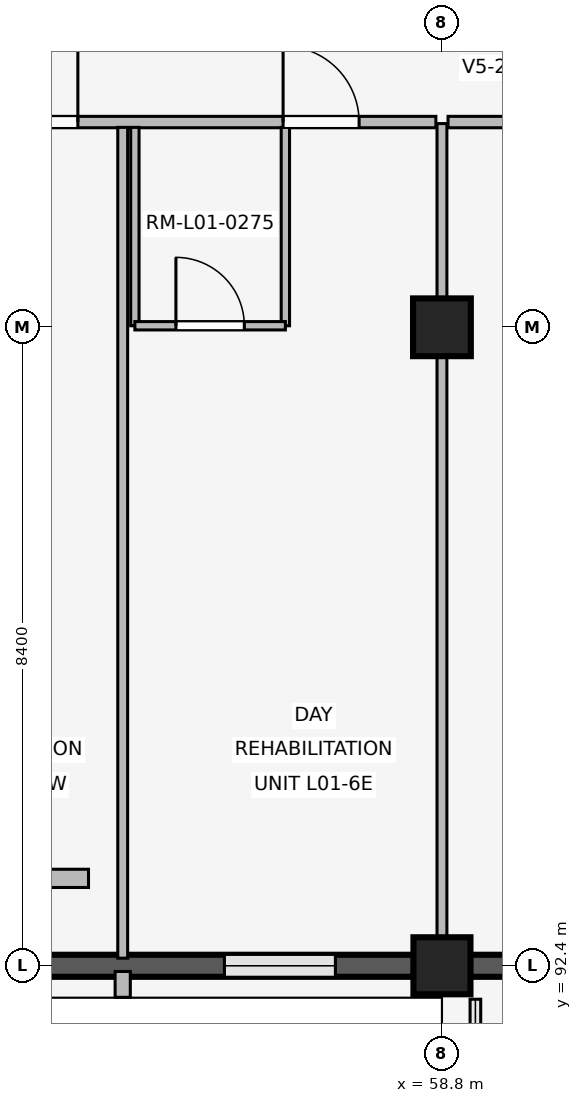
"""IFC4 building model, lengths in metres.
Left out: names, types, materials, properties, quantities, classifications, styles, units other than length and angle.
Written with IfcOpenShell. Run it as: python <this file> out.ifc"""

import sys

from ifc_helpers import new_model, si_unit, direction, frame, frame_2d, origin, origin_2d, place, context, subcontext, project, spatial, rectangle, extrude, element, fill, save


model = new_model("IFC4")
c1 = context("Model", 3, precision=1e-05, world=origin(), true_north=direction((0.0, 1.0)))
c2 = subcontext(c1, "Body", "Model", "MODEL_VIEW")
j1 = project(units=[si_unit("LENGTHUNIT", "METRE"), si_unit("PLANEANGLEUNIT", "RADIAN")], contexts=[c1])
p1 = place(None, origin())
s1 = spatial("IfcSite", under=j1, at=p1, CompositionType="ELEMENT")
p2 = place(p1, origin())
s2 = spatial("IfcBuilding", under=s1, at=p2, CompositionType="ELEMENT")
p3 = place(p2, frame((0.0, 0.0, 4.8)))
s3 = spatial("IfcBuildingStorey", under=s2, at=p3, CompositionType="ELEMENT", Elevation=4.8)
p4 = place(p3, frame((58.8, 92.4, 0.0), z_axis=(0.0, 0.0, 1.0), x_axis=(1.0, 0.0, 0.0)))
e1 = element("IfcColumn", 1, at=p4, inside=s3, PredefinedType="COLUMN", context=c2, shape_type="SweptSolid", body=[
    extrude(rectangle(XDim=0.75, YDim=0.75, at=origin_2d()), origin(), (0.0, 0.0, 1.0), 3.3),
])
p5 = place(p3, frame((58.8, 100.8, 0.0), z_axis=(0.0, 0.0, 1.0), x_axis=(1.0, 0.0, 0.0)))
e2 = element("IfcColumn", 2, at=p5, inside=s3, PredefinedType="COLUMN", context=c2, shape_type="SweptSolid", body=[
    extrude(rectangle(XDim=0.76, YDim=0.76, at=origin_2d()), origin(), (0.0, 0.0, 1.0), 3.3),
])
p6 = place(p3, frame((58.43, 92.4, 0.0), z_axis=(0.0, 0.0, 1.0), x_axis=(-1.0, 0.0, 0.0)))
e3 = element("IfcWall", 3, at=p6, inside=s3, PredefinedType="SOLIDWALL", context=c2, shape_type="SweptSolid", body=[
    extrude(rectangle(XDim=7.66, YDim=0.29, at=frame_2d((3.83, 0.0))), origin(), (0.0, 0.0, 1.0), 2.42),
])
p7 = place(p6, frame((1.032, 0.0, 0.85)))
e4 = element("IfcOpeningElement", 4, at=p7, cuts=e3, PredefinedType="OPENING", context=c2, shape_type="SweptSolid", body=[
    extrude(rectangle(XDim=1.46, YDim=0.85, at=frame_2d((0.73, 0.425))), frame((0.0, 0.155, 0.0), z_axis=(0.0, -1.0, 0.0), x_axis=(1.0, 0.0, 0.0)), (0.0, 0.0, 1.0), 0.31),
])
p8 = place(p6, frame((5.168, 0.0, 0.85)))
e5 = element("IfcOpeningElement", 5, at=p8, cuts=e3, PredefinedType="OPENING", context=c2, shape_type="SweptSolid", body=[
    extrude(rectangle(XDim=1.46, YDim=0.85, at=frame_2d((0.73, 0.425))), frame((0.0, 0.155, 0.0), z_axis=(0.0, -1.0, 0.0), x_axis=(1.0, 0.0, 0.0)), (0.0, 0.0, 1.0), 0.31),
])
p9 = place(p3, frame((54.6, 92.325, 0.0), z_axis=(0.0, 0.0, 1.0), x_axis=(0.0, -1.0, 0.0)))
e6 = element("IfcWall", 6, at=p9, inside=s3, PredefinedType="ELEMENTEDWALL", context=c2, shape_type="SweptSolid", body=[
    extrude(rectangle(XDim=0.34, YDim=0.2, at=frame_2d((0.17, 0.0))), origin(), (0.0, 0.0, 1.0), 2.4),
])
p10 = place(p3, frame((66.83, 92.4, 0.0), z_axis=(0.0, 0.0, 1.0), x_axis=(-1.0, 0.0, 0.0)))
e7 = element("IfcWall", 7, at=p10, inside=s3, PredefinedType="SOLIDWALL", context=c2, shape_type="SweptSolid", body=[
    extrude(rectangle(XDim=7.66, YDim=0.29, at=frame_2d((3.83, 0.0))), origin(), (0.0, 0.0, 1.0), 2.42),
])
p11 = place(p10, frame((2.88, 0.0, 0.0)))
e8 = element("IfcOpeningElement", 8, at=p11, cuts=e7, PredefinedType="OPENING", context=c2, shape_type="SweptSolid", body=[
    extrude(rectangle(XDim=1.9, YDim=2.3, at=frame_2d((0.95, 1.15))), frame((0.0, 0.155, 0.0), z_axis=(0.0, -1.0, 0.0), x_axis=(1.0, 0.0, 0.0)), (0.0, 0.0, 1.0), 0.31),
])
p12 = place(p3, frame((50.76, 103.5, 0.0), z_axis=(0.0, 0.0, 1.0), x_axis=(1.0, 0.0, 0.0)))
e9 = element("IfcWall", 9, at=p12, inside=s3, PredefinedType="PARTITIONING", context=c2, shape_type="SweptSolid", body=[
    extrude(rectangle(XDim=7.96, YDim=0.15, at=frame_2d((3.98, 0.0))), origin(), (0.0, 0.0, 1.0), 2.4),
])
p13 = place(p12, frame((2.25, 0.0, 0.0)))
e10 = element("IfcOpeningElement", 10, at=p13, cuts=e9, PredefinedType="OPENING", context=c2, shape_type="SweptSolid", body=[
    extrude(rectangle(XDim=1.0, YDim=2.15, at=frame_2d((0.5, 1.075))), frame((0.0, 0.085, 0.0), z_axis=(0.0, -1.0, 0.0), x_axis=(1.0, 0.0, 0.0)), (0.0, 0.0, 1.0), 0.17),
])
p14 = place(p12, frame((5.95, 0.0, 0.0)))
e11 = element("IfcOpeningElement", 11, at=p14, cuts=e9, PredefinedType="OPENING", context=c2, shape_type="SweptSolid", body=[
    extrude(rectangle(XDim=1.0, YDim=2.15, at=frame_2d((0.5, 1.075))), frame((0.0, 0.085, 0.0), z_axis=(0.0, -1.0, 0.0), x_axis=(1.0, 0.0, 0.0)), (0.0, 0.0, 1.0), 0.17),
])
p15 = place(p3, frame((54.6, 92.5, 0.0), z_axis=(0.0, 0.0, 1.0), x_axis=(0.0, 1.0, 0.0)))
e12 = element("IfcWall", 12, at=p15, inside=s3, PredefinedType="PARTITIONING", context=c2, shape_type="SweptSolid", body=[
    extrude(rectangle(XDim=10.93, YDim=0.13, at=frame_2d((5.465, 0.0))), origin(), (0.0, 0.0, 1.0), 2.4),
])
for number, where, z_axis, x_axis in (
    (13, (54.76, 100.82, 0.0), (0.0, 0.0, 1.0), (0.0, 1.0, 0.0)),
    (14, (56.74, 100.82, 0.0), (0.0, 0.0, 1.0), (0.0, 1.0, 0.0)),
):
    element("IfcWall", number, at=place(p3, frame(where, z_axis=z_axis, x_axis=x_axis)), inside=s3, PredefinedType="PARTITIONING", context=c2, shape_type="SweptSolid", body=[
        extrude(rectangle(XDim=2.61, YDim=0.11, at=frame_2d((1.305, 0.0))), origin(), (0.0, 0.0, 1.0), 2.4),
    ])
p16 = place(p3, frame((54.76, 100.82, 0.0), z_axis=(0.0, 0.0, 1.0), x_axis=(1.0, 0.0, 0.0)))
e15 = element("IfcWall", 15, at=p16, inside=s3, PredefinedType="PARTITIONING", context=c2, shape_type="SweptSolid", body=[
    extrude(rectangle(XDim=1.98, YDim=0.11, at=frame_2d((0.99, 0.0))), origin(), (0.0, 0.0, 1.0), 2.4),
])
p17 = place(p16, frame((0.54, 0.0, 0.0)))
e16 = element("IfcOpeningElement", 16, at=p17, cuts=e15, PredefinedType="OPENING", context=c2, shape_type="SweptSolid", body=[
    extrude(rectangle(XDim=0.9, YDim=2.1, at=frame_2d((0.45, 1.05))), frame((0.0, 0.065, 0.0), z_axis=(0.0, -1.0, 0.0), x_axis=(1.0, 0.0, 0.0)), (0.0, 0.0, 1.0), 0.13),
])
p18 = place(p3, frame((53.25, 93.55, 0.0), z_axis=(0.0, 0.0, 1.0), x_axis=(1.0, 0.0, 0.0)))
e17 = element("IfcWall", 17, at=p18, inside=s3, PredefinedType="PLUMBINGWALL", context=c2, shape_type="SweptSolid", body=[
    extrude(rectangle(XDim=0.9, YDim=0.24, at=frame_2d((0.45, 0.0))), origin(), (0.0, 0.0, 1.0), 2.4),
])
p19 = place(p3, frame((58.8, 92.54, 0.0), z_axis=(0.0, 0.0, 1.0), x_axis=(0.0, 1.0, 0.0)))
e18 = element("IfcWall", 18, at=p19, inside=s3, PredefinedType="PARTITIONING", context=c2, shape_type="SweptSolid", body=[
    extrude(rectangle(XDim=10.94, YDim=0.13, at=frame_2d((5.47, 0.0))), origin(), (0.0, 0.0, 1.0), 2.4),
])
p20 = place(p3, frame((58.88, 103.5, 0.0), z_axis=(0.0, 0.0, 1.0), x_axis=(1.0, 0.0, 0.0)))
e19 = element("IfcWall", 19, at=p20, inside=s3, PredefinedType="PARTITIONING", context=c2, shape_type="SweptSolid", body=[
    extrude(rectangle(XDim=8.24, YDim=0.15, at=frame_2d((4.12, 0.0))), origin(), (0.0, 0.0, 1.0), 2.4),
])
p21 = place(p20, frame((3.17, 0.0, 0.0)))
e20 = element("IfcOpeningElement", 20, at=p21, cuts=e19, PredefinedType="OPENING", context=c2, shape_type="SweptSolid", body=[
    extrude(rectangle(XDim=1.9, YDim=2.3, at=frame_2d((0.95, 1.15))), frame((0.0, 0.085, 0.0), z_axis=(0.0, -1.0, 0.0), x_axis=(1.0, 0.0, 0.0)), (0.0, 0.0, 1.0), 0.17),
])
p22 = place(p7, origin())
e21 = element("IfcWindow", 21, at=p22, inside=s3, PartitioningType="SINGLE_PANEL", PredefinedType="WINDOW", context=c2, shape_type="SweptSolid", body=[
    extrude(rectangle(XDim=1.46, YDim=0.85, at=frame_2d((0.73, 0.425))), frame((0.0, 0.03, 0.0), z_axis=(0.0, -1.0, 0.0), x_axis=(1.0, 0.0, 0.0)), (0.0, 0.0, 1.0), 0.06),
])
fill(e4, e21)
p23 = place(p13, origin())
e22 = element("IfcDoor", 22, at=p23, inside=s3, OperationType="SINGLE_SWING_RIGHT", PredefinedType="DOOR", context=c2, shape_type="SweptSolid", body=[
    extrude(rectangle(XDim=1.0, YDim=2.15, at=frame_2d((0.5, 1.075))), frame((0.0, 0.025, 0.0), z_axis=(0.0, -1.0, 0.0), x_axis=(1.0, 0.0, 0.0)), (0.0, 0.0, 1.0), 0.05),
])
fill(e10, e22)
p24 = place(p14, origin())
e23 = element("IfcDoor", 23, at=p24, inside=s3, OperationType="SINGLE_SWING_LEFT", PredefinedType="DOOR", context=c2, shape_type="SweptSolid", body=[
    extrude(rectangle(XDim=1.0, YDim=2.15, at=frame_2d((0.5, 1.075))), frame((0.0, 0.025, 0.0), z_axis=(0.0, -1.0, 0.0), x_axis=(1.0, 0.0, 0.0)), (0.0, 0.0, 1.0), 0.05),
])
fill(e11, e23)
p25 = place(p17, origin())
e24 = element("IfcDoor", 24, at=p25, inside=s3, OperationType="SINGLE_SWING_LEFT", PredefinedType="DOOR", context=c2, shape_type="SweptSolid", body=[
    extrude(rectangle(XDim=0.9, YDim=2.1, at=frame_2d((0.45, 1.05))), frame((0.0, 0.025, 0.0), z_axis=(0.0, -1.0, 0.0), x_axis=(1.0, 0.0, 0.0)), (0.0, 0.0, 1.0), 0.05),
])
fill(e16, e24)
save(model, sys.argv[1])
